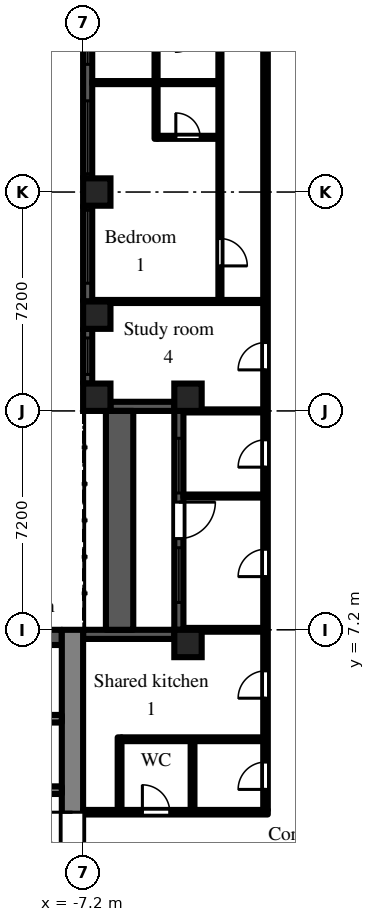
"""IFC4 building model, lengths in metres.
Left out: names, types, materials, properties, quantities, classifications, styles, units other than length and angle.
Written with IfcOpenShell. Run it as: python <this file> out.ifc"""

import sys

from ifc_helpers import new_model, si_unit, direction, frame, frame_2d, origin, origin_2d, place, context, subcontext, project, spatial, rectangle, extrude, element, fill, save


model = new_model("IFC4")
c1 = context("Model", 3, precision=1e-05, world=origin(), true_north=direction((0.0, 1.0)))
c2 = subcontext(c1, "Body", "Model", "MODEL_VIEW")
j1 = project(units=[si_unit("LENGTHUNIT", "METRE"), si_unit("PLANEANGLEUNIT", "RADIAN")], contexts=[c1])
p1 = place(None, origin())
s1 = spatial("IfcSite", under=j1, at=p1, CompositionType="ELEMENT")
p2 = place(p1, origin())
s2 = spatial("IfcBuilding", under=s1, at=p2, CompositionType="ELEMENT")
p3 = place(p2, frame((0.0, 0.0, 20.7)))
s3 = spatial("IfcBuildingStorey", under=s2, at=p3, CompositionType="ELEMENT", Elevation=20.7)
for number, where, z_axis, x_axis in (
    (1, (-6.75, 14.85, 0.0), (0.0, 0.0, 1.0), (1.0, 0.0, 0.0)),
    (2, (-6.75, 17.55, 0.0), (0.0, 0.0, 1.0), (1.0, 0.0, 0.0)),
    (3, (-6.75, 21.6, 0.0), (0.0, 0.0, 1.0), (1.0, 0.0, 0.0)),
    (4, (-3.75, 6.75, 0.0), (0.0, 0.0, 1.0), (1.0, 0.0, 0.0)),
    (5, (-3.75, 14.85, 0.0), (0.0, 0.0, 1.0), (1.0, 0.0, 0.0)),
):
    element("IfcColumn", number, at=place(p3, frame(where, z_axis=z_axis, x_axis=x_axis)), inside=s3, PredefinedType="COLUMN", context=c2, shape_type="SweptSolid", body=[
        extrude(rectangle(XDim=0.9, YDim=0.9, at=origin_2d()), origin(), (0.0, 0.0, 1.0), 3.0),
    ])
p4 = place(p3, frame((-7.05, 28.35, 0.0), z_axis=(0.0, 0.0, 1.0), x_axis=(0.0, -1.0, 0.0)))
e6 = element("IfcWall", 6, at=p4, inside=s3, PredefinedType="SOLIDWALL", context=c2, shape_type="SweptSolid", body=[
    extrude(rectangle(XDim=6.3, YDim=0.3, at=frame_2d((3.15, 0.0))), origin(), (0.0, 0.0, 1.0), 2.1),
])
p5 = place(p4, frame((0.15, 0.0, 0.2)))
e7 = element("IfcOpeningElement", 7, at=p5, cuts=e6, PredefinedType="OPENING", context=c2, shape_type="SweptSolid", body=[
    extrude(rectangle(XDim=2.4, YDim=1.85, at=frame_2d((1.2, 0.925))), frame((0.0, 0.16, 0.0), z_axis=(0.0, -1.0, 0.0), x_axis=(1.0, 0.0, 0.0)), (0.0, 0.0, 1.0), 0.32),
])
p6 = place(p4, frame((3.75, 0.0, 0.2)))
e8 = element("IfcOpeningElement", 8, at=p6, cuts=e6, PredefinedType="OPENING", context=c2, shape_type="SweptSolid", body=[
    extrude(rectangle(XDim=2.4, YDim=1.85, at=frame_2d((1.2, 0.925))), frame((0.0, 0.16, 0.0), z_axis=(0.0, -1.0, 0.0), x_axis=(1.0, 0.0, 0.0)), (0.0, 0.0, 1.0), 0.32),
])
p7 = place(p3, frame((-7.05, 21.15, 0.0), z_axis=(0.0, 0.0, 1.0), x_axis=(0.0, -1.0, 0.0)))
e9 = element("IfcWall", 9, at=p7, inside=s3, PredefinedType="SOLIDWALL", context=c2, shape_type="SweptSolid", body=[
    extrude(rectangle(XDim=3.15, YDim=0.3, at=frame_2d((1.575, 0.0))), origin(), (0.0, 0.0, 1.0), 2.1),
])
p8 = place(p7, frame((0.15, 0.0, 0.2)))
e10 = element("IfcOpeningElement", 10, at=p8, cuts=e9, PredefinedType="OPENING", context=c2, shape_type="SweptSolid", body=[
    extrude(rectangle(XDim=2.4, YDim=1.85, at=frame_2d((1.2, 0.925))), frame((0.0, 0.16, 0.0), z_axis=(0.0, -1.0, 0.0), x_axis=(1.0, 0.0, 0.0)), (0.0, 0.0, 1.0), 0.32),
])
p9 = place(p3, frame((-7.05, 17.1, 0.0), z_axis=(0.0, 0.0, 1.0), x_axis=(0.0, -1.0, 0.0)))
e11 = element("IfcWall", 11, at=p9, inside=s3, PredefinedType="SOLIDWALL", context=c2, shape_type="SweptSolid", body=[
    extrude(rectangle(XDim=1.8, YDim=0.3, at=frame_2d((0.9, 0.0))), origin(), (0.0, 0.0, 1.0), 2.1),
])
p10 = place(p9, frame((0.3, 0.0, 0.2)))
e12 = element("IfcOpeningElement", 12, at=p10, cuts=e11, PredefinedType="OPENING", context=c2, shape_type="SweptSolid", body=[
    extrude(rectangle(XDim=1.2, YDim=1.85, at=frame_2d((0.6, 0.925))), frame((0.0, 0.16, 0.0), z_axis=(0.0, -1.0, 0.0), x_axis=(1.0, 0.0, 0.0)), (0.0, 0.0, 1.0), 0.32),
])
p11 = place(p3, frame((-6.3, 14.55, 0.0), z_axis=(0.0, 0.0, 1.0), x_axis=(1.0, 0.0, 0.0)))
e13 = element("IfcWall", 13, at=p11, inside=s3, PredefinedType="SOLIDWALL", context=c2, shape_type="SweptSolid", body=[
    extrude(rectangle(XDim=2.1, YDim=0.3, at=frame_2d((1.05, 0.0))), origin(), (0.0, 0.0, 1.0), 2.1),
])
p12 = place(p3, frame((-4.05, 14.4, 0.0), z_axis=(0.0, 0.0, 1.0), x_axis=(0.0, -1.0, 0.0)))
e14 = element("IfcWall", 14, at=p12, inside=s3, PredefinedType="SOLIDWALL", context=c2, shape_type="SweptSolid", body=[
    extrude(rectangle(XDim=7.2, YDim=0.3, at=frame_2d((3.6, 0.0))), origin(), (0.0, 0.0, 1.0), 2.1),
])
p13 = place(p12, frame((3.0, 0.0, 0.0)))
e15 = element("IfcOpeningElement", 15, at=p13, cuts=e14, PredefinedType="OPENING", context=c2, shape_type="SweptSolid", body=[
    extrude(rectangle(XDim=1.2, YDim=2.05, at=frame_2d((0.6, 1.025))), frame((0.0, 0.16, 0.0), z_axis=(0.0, -1.0, 0.0), x_axis=(1.0, 0.0, 0.0)), (0.0, 0.0, 1.0), 0.32),
])
p14 = place(p12, frame((0.9, 0.0, 0.2)))
e16 = element("IfcOpeningElement", 16, at=p14, cuts=e14, PredefinedType="OPENING", context=c2, shape_type="SweptSolid", body=[
    extrude(rectangle(XDim=1.8, YDim=1.85, at=frame_2d((0.9, 0.925))), frame((0.0, 0.16, 0.0), z_axis=(0.0, -1.0, 0.0), x_axis=(1.0, 0.0, 0.0)), (0.0, 0.0, 1.0), 0.32),
])
p15 = place(p12, frame((4.5, 0.0, 0.2)))
e17 = element("IfcOpeningElement", 17, at=p15, cuts=e14, PredefinedType="OPENING", context=c2, shape_type="SweptSolid", body=[
    extrude(rectangle(XDim=1.8, YDim=1.85, at=frame_2d((0.9, 0.925))), frame((0.0, 0.16, 0.0), z_axis=(0.0, -1.0, 0.0), x_axis=(1.0, 0.0, 0.0)), (0.0, 0.0, 1.0), 0.32),
])
p16 = place(p3, frame((-4.2, 7.05, 0.0), z_axis=(0.0, 0.0, 1.0), x_axis=(-1.0, 0.0, 0.0)))
e18 = element("IfcWall", 18, at=p16, inside=s3, PredefinedType="SOLIDWALL", context=c2, shape_type="SweptSolid", body=[
    extrude(rectangle(XDim=3.0, YDim=0.3, at=frame_2d((1.5, 0.0))), origin(), (0.0, 0.0, 1.0), 2.1),
])
p17 = place(p3, frame((-6.0, 7.2, 0.0), z_axis=(0.0, 0.0, 1.0), x_axis=(0.0, 1.0, 0.0)))
e19 = element("IfcWall", 19, at=p17, inside=s3, PredefinedType="PARAPET", context=c2, shape_type="SweptSolid", body=[
    extrude(rectangle(XDim=7.2, YDim=0.9, at=frame_2d((3.6, 0.0))), origin(), (0.0, 0.0, 1.0), 0.8),
])
p18 = place(p3, frame((-7.55, -7.2, 0.0), z_axis=(0.0, 0.0, 1.0), x_axis=(0.0, 1.0, 0.0)))
e20 = element("IfcWall", 20, at=p18, inside=s3, PredefinedType="SHEAR", context=c2, shape_type="SweptSolid", body=[
    extrude(rectangle(XDim=14.4, YDim=0.7, at=frame_2d((7.2, 0.0))), origin(), (0.0, 0.0, 1.0), 2.575),
])
p19 = place(p18, frame((6.0, 0.0, 0.0)))
e21 = element("IfcOpeningElement", 21, at=p19, cuts=e20, PredefinedType="OPENING", context=c2, shape_type="SweptSolid", body=[
    extrude(rectangle(XDim=2.4, YDim=2.2, at=frame_2d((1.2, 1.1))), frame((0.0, 0.36, 0.0), z_axis=(0.0, -1.0, 0.0), x_axis=(1.0, 0.0, 0.0)), (0.0, 0.0, 1.0), 0.72),
])
p20 = place(p3, frame((-7.9, 6.95, 0.0), z_axis=(0.0, 0.0, 1.0), x_axis=(-1.0, 0.0, 0.0)))
e22 = element("IfcWall", 22, at=p20, inside=s3, PredefinedType="SHEAR", context=c2, shape_type="SweptSolid", body=[
    extrude(rectangle(XDim=12.95, YDim=0.5, at=frame_2d((6.475, 0.0))), origin(), (0.0, 0.0, 1.0), 2.575),
])
p21 = place(p3, frame((-7.9, 1.925, 0.0), z_axis=(0.0, 0.0, 1.0), x_axis=(-1.0, 0.0, 0.0)))
e23 = element("IfcWall", 23, at=p21, inside=s3, PredefinedType="SHEAR", context=c2, shape_type="SweptSolid", body=[
    extrude(rectangle(XDim=12.95, YDim=0.25, at=frame_2d((6.475, 0.0))), origin(), (0.0, 0.0, 1.0), 2.575),
])
p22 = place(p21, frame((0.525, 0.0, 0.0)))
e24 = element("IfcOpeningElement", 24, at=p22, cuts=e23, PredefinedType="OPENING", context=c2, shape_type="SweptSolid", body=[
    extrude(rectangle(XDim=0.9, YDim=2.1, at=frame_2d((0.45, 1.05))), frame((0.0, 0.135, 0.0), z_axis=(0.0, -1.0, 0.0), x_axis=(1.0, 0.0, 0.0)), (0.0, 0.0, 1.0), 0.27),
])
p23 = place(p21, frame((2.625, 0.0, 0.0)))
e25 = element("IfcOpeningElement", 25, at=p23, cuts=e23, PredefinedType="OPENING", context=c2, shape_type="SweptSolid", body=[
    extrude(rectangle(XDim=1.1, YDim=2.1, at=frame_2d((0.55, 1.05))), frame((0.0, 0.135, 0.0), z_axis=(0.0, -1.0, 0.0), x_axis=(1.0, 0.0, 0.0)), (0.0, 0.0, 1.0), 0.27),
])
p24 = place(p21, frame((4.925, 0.0, 0.0)))
e26 = element("IfcOpeningElement", 26, at=p24, cuts=e23, PredefinedType="OPENING", context=c2, shape_type="SweptSolid", body=[
    extrude(rectangle(XDim=0.9, YDim=2.1, at=frame_2d((0.45, 1.05))), frame((0.0, 0.135, 0.0), z_axis=(0.0, -1.0, 0.0), x_axis=(1.0, 0.0, 0.0)), (0.0, 0.0, 1.0), 0.27),
])
p25 = place(p21, frame((8.225, 0.0, 0.0)))
e27 = element("IfcOpeningElement", 27, at=p25, cuts=e23, PredefinedType="OPENING", context=c2, shape_type="SweptSolid", body=[
    extrude(rectangle(XDim=0.9, YDim=2.1, at=frame_2d((0.45, 1.05))), frame((0.0, 0.135, 0.0), z_axis=(0.0, -1.0, 0.0), x_axis=(1.0, 0.0, 0.0)), (0.0, 0.0, 1.0), 0.27),
])
p26 = place(p3, frame((-7.9, 4.275, 0.0), z_axis=(0.0, 0.0, 1.0), x_axis=(-1.0, 0.0, 0.0)))
e28 = element("IfcWall", 28, at=p26, inside=s3, PredefinedType="SHEAR", context=c2, shape_type="SweptSolid", body=[
    extrude(rectangle(XDim=1.95, YDim=0.25, at=frame_2d((0.975, 0.0))), origin(), (0.0, 0.0, 1.0), 2.575),
])
p27 = place(p3, frame((-7.2, 1.2, 0.0), z_axis=(0.0, 0.0, 1.0), x_axis=(1.0, 0.0, 0.0)))
e29 = element("IfcWall", 29, at=p27, inside=s3, PredefinedType="PARTITIONING", context=c2, shape_type="SweptSolid", body=[
    extrude(rectangle(XDim=6.075, YDim=0.15, at=frame_2d((3.038, 0.0))), origin(), (0.0, 0.0, 1.0), 2.575),
])
p28 = place(p27, frame((1.95, 0.0, 0.0)))
e30 = element("IfcOpeningElement", 30, at=p28, cuts=e29, PredefinedType="OPENING", context=c2, shape_type="SweptSolid", body=[
    extrude(rectangle(XDim=0.9, YDim=2.1, at=frame_2d((0.45, 1.05))), frame((0.0, 0.085, 0.0), z_axis=(0.0, -1.0, 0.0), x_axis=(1.0, 0.0, 0.0)), (0.0, 0.0, 1.0), 0.17),
])
p29 = place(p3, frame((-6.9, 18.0, 0.0), z_axis=(0.0, 0.0, 1.0), x_axis=(1.0, 0.0, 0.0)))
e31 = element("IfcWall", 31, at=p29, inside=s3, PredefinedType="PARTITIONING", context=c2, shape_type="SweptSolid", body=[
    extrude(rectangle(XDim=5.625, YDim=0.1, at=frame_2d((2.812, 0.0))), origin(), (0.0, 0.0, 1.0), 2.575),
])
p30 = place(p3, frame((-6.9, 25.2, 0.0), z_axis=(0.0, 0.0, 1.0), x_axis=(1.0, 0.0, 0.0)))
e32 = element("IfcWall", 32, at=p30, inside=s3, PredefinedType="PARTITIONING", context=c2, shape_type="SweptSolid", body=[
    extrude(rectangle(XDim=4.15, YDim=0.1, at=frame_2d((2.075, 0.0))), origin(), (0.0, 0.0, 1.0), 2.575),
])
p31 = place(p3, frame((-6.0, 1.275, 0.0), z_axis=(0.0, 0.0, 1.0), x_axis=(0.0, 1.0, 0.0)))
e33 = element("IfcWall", 33, at=p31, inside=s3, PredefinedType="PARTITIONING", context=c2, shape_type="SweptSolid", body=[
    extrude(rectangle(XDim=2.388, YDim=0.125, at=frame_2d((1.194, 0.0))), origin(), (0.0, 0.0, 1.0), 2.575),
])
p32 = place(p3, frame((-5.938, 3.6, 0.0), z_axis=(0.0, 0.0, 1.0), x_axis=(1.0, 0.0, 0.0)))
e34 = element("IfcWall", 34, at=p32, inside=s3, PredefinedType="PARTITIONING", context=c2, shape_type="SweptSolid", body=[
    extrude(rectangle(XDim=4.663, YDim=0.125, at=frame_2d((2.331, 0.0))), origin(), (0.0, 0.0, 1.0), 2.575),
])
p33 = place(p3, frame((-4.8, 23.35, 0.0), z_axis=(0.0, 0.0, 1.0), x_axis=(0.0, 1.0, 0.0)))
e35 = element("IfcWall", 35, at=p33, inside=s3, PredefinedType="PARTITIONING", context=c2, shape_type="SweptSolid", body=[
    extrude(rectangle(XDim=3.7, YDim=0.1, at=frame_2d((1.85, 0.0))), origin(), (0.0, 0.0, 1.0), 2.575),
])
p34 = place(p3, frame((-4.75, 23.4, 0.0), z_axis=(0.0, 0.0, 1.0), x_axis=(1.0, 0.0, 0.0)))
e36 = element("IfcWall", 36, at=p34, inside=s3, PredefinedType="PARTITIONING", context=c2, shape_type="SweptSolid", body=[
    extrude(rectangle(XDim=2.0, YDim=0.1, at=frame_2d((1.0, 0.0))), origin(), (0.0, 0.0, 1.0), 2.575),
])
p35 = place(p34, frame((0.6, 0.0, 0.0)))
e37 = element("IfcOpeningElement", 37, at=p35, cuts=e36, PredefinedType="OPENING", context=c2, shape_type="SweptSolid", body=[
    extrude(rectangle(XDim=0.8, YDim=2.1, at=frame_2d((0.4, 1.05))), frame((0.0, 0.06, 0.0), z_axis=(0.0, -1.0, 0.0), x_axis=(1.0, 0.0, 0.0)), (0.0, 0.0, 1.0), 0.12),
])
p36 = place(p3, frame((-3.9, 7.2, 0.0), z_axis=(0.0, 0.0, 1.0), x_axis=(1.0, 0.0, 0.0)))
e38 = element("IfcWall", 38, at=p36, inside=s3, PredefinedType="PARTITIONING", context=c2, shape_type="SweptSolid", body=[
    extrude(rectangle(XDim=2.625, YDim=0.125, at=frame_2d((1.312, 0.0))), origin(), (0.0, 0.0, 1.0), 2.575),
])
for number, where, z_axis, x_axis in (
    (39, (-3.9, 11.6, 0.0), (0.0, 0.0, 1.0), (1.0, 0.0, 0.0)),
    (40, (-3.9, 14.4, 0.0), (0.0, 0.0, 1.0), (1.0, 0.0, 0.0)),
):
    element("IfcWall", number, at=place(p3, frame(where, z_axis=z_axis, x_axis=x_axis)), inside=s3, PredefinedType="PARTITIONING", context=c2, shape_type="SweptSolid", body=[
        extrude(rectangle(XDim=2.625, YDim=0.1, at=frame_2d((1.312, 0.0))), origin(), (0.0, 0.0, 1.0), 2.575),
    ])
p37 = place(p3, frame((-3.6, 1.275, 0.0), z_axis=(0.0, 0.0, 1.0), x_axis=(0.0, 1.0, 0.0)))
e41 = element("IfcWall", 41, at=p37, inside=s3, PredefinedType="PARTITIONING", context=c2, shape_type="SweptSolid", body=[
    extrude(rectangle(XDim=2.263, YDim=0.125, at=frame_2d((1.131, 0.0))), origin(), (0.0, 0.0, 1.0), 2.575),
])
p38 = place(p3, frame((-2.7, 18.05, 0.0), z_axis=(0.0, 0.0, 1.0), x_axis=(0.0, 1.0, 0.0)))
e42 = element("IfcWall", 42, at=p38, inside=s3, PredefinedType="PARTITIONING", context=c2, shape_type="SweptSolid", body=[
    extrude(rectangle(XDim=14.3, YDim=0.1, at=frame_2d((7.15, 0.0))), origin(), (0.0, 0.0, 1.0), 2.575),
])
p39 = place(p38, frame((1.12, 0.0, 0.0)))
e43 = element("IfcOpeningElement", 43, at=p39, cuts=e42, PredefinedType="OPENING", context=c2, shape_type="SweptSolid", body=[
    extrude(rectangle(XDim=0.9, YDim=2.1, at=frame_2d((0.45, 1.05))), frame((0.0, 0.06, 0.0), z_axis=(0.0, -1.0, 0.0), x_axis=(1.0, 0.0, 0.0)), (0.0, 0.0, 1.0), 0.12),
])
p40 = place(p38, frame((12.28, 0.0, 0.0)))
e44 = element("IfcOpeningElement", 44, at=p40, cuts=e42, PredefinedType="OPENING", context=c2, shape_type="SweptSolid", body=[
    extrude(rectangle(XDim=0.9, YDim=2.1, at=frame_2d((0.45, 1.05))), frame((0.0, 0.06, 0.0), z_axis=(0.0, -1.0, 0.0), x_axis=(1.0, 0.0, 0.0)), (0.0, 0.0, 1.0), 0.12),
])
p41 = place(p3, frame((-1.2, 1.275, 0.0), z_axis=(0.0, 0.0, 1.0), x_axis=(0.0, 1.0, 0.0)))
e45 = element("IfcWall", 45, at=p41, inside=s3, PredefinedType="PARTITIONING", context=c2, shape_type="SweptSolid", body=[
    extrude(rectangle(XDim=35.225, YDim=0.15, at=frame_2d((17.613, 0.0))), origin(), (0.0, 0.0, 1.0), 2.575),
])
p42 = place(p41, frame((0.675, 0.0, 0.0)))
e46 = element("IfcOpeningElement", 46, at=p42, cuts=e45, PredefinedType="OPENING", context=c2, shape_type="SweptSolid", body=[
    extrude(rectangle(XDim=0.9, YDim=2.1, at=frame_2d((0.45, 1.05))), frame((0.0, 0.085, 0.0), z_axis=(0.0, -1.0, 0.0), x_axis=(1.0, 0.0, 0.0)), (0.0, 0.0, 1.0), 0.17),
])
p43 = place(p41, frame((3.675, 0.0, 0.0)))
e47 = element("IfcOpeningElement", 47, at=p43, cuts=e45, PredefinedType="OPENING", context=c2, shape_type="SweptSolid", body=[
    extrude(rectangle(XDim=0.9, YDim=2.1, at=frame_2d((0.45, 1.05))), frame((0.0, 0.085, 0.0), z_axis=(0.0, -1.0, 0.0), x_axis=(1.0, 0.0, 0.0)), (0.0, 0.0, 1.0), 0.17),
])
p44 = place(p41, frame((11.275, 0.0, 0.0)))
e48 = element("IfcOpeningElement", 48, at=p44, cuts=e45, PredefinedType="OPENING", context=c2, shape_type="SweptSolid", body=[
    extrude(rectangle(XDim=0.9, YDim=2.1, at=frame_2d((0.45, 1.05))), frame((0.0, 0.085, 0.0), z_axis=(0.0, -1.0, 0.0), x_axis=(1.0, 0.0, 0.0)), (0.0, 0.0, 1.0), 0.17),
])
p45 = place(p41, frame((7.675, 0.0, 0.0)))
e49 = element("IfcOpeningElement", 49, at=p45, cuts=e45, PredefinedType="OPENING", context=c2, shape_type="SweptSolid", body=[
    extrude(rectangle(XDim=0.9, YDim=2.1, at=frame_2d((0.45, 1.05))), frame((0.0, 0.085, 0.0), z_axis=(0.0, -1.0, 0.0), x_axis=(1.0, 0.0, 0.0)), (0.0, 0.0, 1.0), 0.17),
])
p46 = place(p41, frame((14.475, 0.0, 0.0)))
e50 = element("IfcOpeningElement", 50, at=p46, cuts=e45, PredefinedType="OPENING", context=c2, shape_type="SweptSolid", body=[
    extrude(rectangle(XDim=0.9, YDim=2.1, at=frame_2d((0.45, 1.05))), frame((0.0, 0.085, 0.0), z_axis=(0.0, -1.0, 0.0), x_axis=(1.0, 0.0, 0.0)), (0.0, 0.0, 1.0), 0.17),
])
p47 = place(p41, frame((32.675, 0.0, 0.0)))
e51 = element("IfcOpeningElement", 51, at=p47, cuts=e45, PredefinedType="OPENING", context=c2, shape_type="SweptSolid", body=[
    extrude(rectangle(XDim=1.0, YDim=2.1, at=frame_2d((0.5, 1.05))), frame((0.0, 0.085, 0.0), z_axis=(0.0, -1.0, 0.0), x_axis=(1.0, 0.0, 0.0)), (0.0, 0.0, 1.0), 0.17),
])
p48 = place(p5, origin())
e52 = element("IfcWindow", 52, at=p48, inside=s3, PartitioningType="SINGLE_PANEL", PredefinedType="WINDOW", context=c2, shape_type="SweptSolid", body=[
    extrude(rectangle(XDim=2.4, YDim=1.85, at=frame_2d((1.2, 0.925))), frame((0.0, 0.03, 0.0), z_axis=(0.0, -1.0, 0.0), x_axis=(1.0, 0.0, 0.0)), (0.0, 0.0, 1.0), 0.06),
])
fill(e7, e52)
p49 = place(p6, origin())
e53 = element("IfcWindow", 53, at=p49, inside=s3, PartitioningType="SINGLE_PANEL", PredefinedType="WINDOW", context=c2, shape_type="SweptSolid", body=[
    extrude(rectangle(XDim=2.4, YDim=1.85, at=frame_2d((1.2, 0.925))), frame((0.0, 0.03, 0.0), z_axis=(0.0, -1.0, 0.0), x_axis=(1.0, 0.0, 0.0)), (0.0, 0.0, 1.0), 0.06),
])
fill(e8, e53)
p50 = place(p8, origin())
e54 = element("IfcWindow", 54, at=p50, inside=s3, PartitioningType="SINGLE_PANEL", PredefinedType="WINDOW", context=c2, shape_type="SweptSolid", body=[
    extrude(rectangle(XDim=2.4, YDim=1.85, at=frame_2d((1.2, 0.925))), frame((0.0, 0.03, 0.0), z_axis=(0.0, -1.0, 0.0), x_axis=(1.0, 0.0, 0.0)), (0.0, 0.0, 1.0), 0.06),
])
fill(e10, e54)
p51 = place(p10, origin())
e55 = element("IfcWindow", 55, at=p51, inside=s3, PartitioningType="SINGLE_PANEL", PredefinedType="WINDOW", context=c2, shape_type="SweptSolid", body=[
    extrude(rectangle(XDim=1.2, YDim=1.85, at=frame_2d((0.6, 0.925))), frame((0.0, 0.03, 0.0), z_axis=(0.0, -1.0, 0.0), x_axis=(1.0, 0.0, 0.0)), (0.0, 0.0, 1.0), 0.06),
])
fill(e12, e55)
p52 = place(p13, origin())
e56 = element("IfcDoor", 56, at=p52, inside=s3, OperationType="SINGLE_SWING_LEFT", PredefinedType="DOOR", context=c2, shape_type="SweptSolid", body=[
    extrude(rectangle(XDim=1.2, YDim=2.05, at=frame_2d((0.6, 1.025))), frame((0.0, 0.025, 0.0), z_axis=(0.0, -1.0, 0.0), x_axis=(1.0, 0.0, 0.0)), (0.0, 0.0, 1.0), 0.05),
])
fill(e15, e56)
p53 = place(p14, origin())
e57 = element("IfcWindow", 57, at=p53, inside=s3, PartitioningType="SINGLE_PANEL", PredefinedType="WINDOW", context=c2, shape_type="SweptSolid", body=[
    extrude(rectangle(XDim=1.8, YDim=1.85, at=frame_2d((0.9, 0.925))), frame((0.0, 0.03, 0.0), z_axis=(0.0, -1.0, 0.0), x_axis=(1.0, 0.0, 0.0)), (0.0, 0.0, 1.0), 0.06),
])
fill(e16, e57)
p54 = place(p15, origin())
e58 = element("IfcWindow", 58, at=p54, inside=s3, PartitioningType="SINGLE_PANEL", PredefinedType="WINDOW", context=c2, shape_type="SweptSolid", body=[
    extrude(rectangle(XDim=1.8, YDim=1.85, at=frame_2d((0.9, 0.925))), frame((0.0, 0.03, 0.0), z_axis=(0.0, -1.0, 0.0), x_axis=(1.0, 0.0, 0.0)), (0.0, 0.0, 1.0), 0.06),
])
fill(e17, e58)
p55 = place(p19, origin())
e59 = element("IfcDoor", 59, at=p55, inside=s3, OperationType="DOUBLE_DOOR_DOUBLE_SWING", PredefinedType="DOOR", context=c2, shape_type="SweptSolid", body=[
    extrude(rectangle(XDim=2.4, YDim=2.2, at=frame_2d((1.2, 1.1))), frame((0.0, 0.025, 0.0), z_axis=(0.0, -1.0, 0.0), x_axis=(1.0, 0.0, 0.0)), (0.0, 0.0, 1.0), 0.05),
])
fill(e21, e59)
p56 = place(p42, origin())
e60 = element("IfcDoor", 60, at=p56, inside=s3, OperationType="SINGLE_SWING_LEFT", PredefinedType="DOOR", context=c2, shape_type="SweptSolid", body=[
    extrude(rectangle(XDim=0.9, YDim=2.1, at=frame_2d((0.45, 1.05))), frame((0.0, 0.025, 0.0), z_axis=(0.0, -1.0, 0.0), x_axis=(1.0, 0.0, 0.0)), (0.0, 0.0, 1.0), 0.05),
])
fill(e46, e60)
p57 = place(p28, origin())
e61 = element("IfcDoor", 61, at=p57, inside=s3, OperationType="SINGLE_SWING_LEFT", PredefinedType="DOOR", context=c2, shape_type="SweptSolid", body=[
    extrude(rectangle(XDim=0.9, YDim=2.1, at=frame_2d((0.45, 1.05))), frame((0.0, 0.025, 0.0), z_axis=(0.0, -1.0, 0.0), x_axis=(1.0, 0.0, 0.0)), (0.0, 0.0, 1.0), 0.05),
])
fill(e30, e61)
p58 = place(p43, origin())
e62 = element("IfcDoor", 62, at=p58, inside=s3, OperationType="SINGLE_SWING_LEFT", PredefinedType="DOOR", context=c2, shape_type="SweptSolid", body=[
    extrude(rectangle(XDim=0.9, YDim=2.1, at=frame_2d((0.45, 1.05))), frame((0.0, 0.025, 0.0), z_axis=(0.0, -1.0, 0.0), x_axis=(1.0, 0.0, 0.0)), (0.0, 0.0, 1.0), 0.05),
])
fill(e47, e62)
p59 = place(p44, origin())
e63 = element("IfcDoor", 63, at=p59, inside=s3, OperationType="SINGLE_SWING_LEFT", PredefinedType="DOOR", context=c2, shape_type="SweptSolid", body=[
    extrude(rectangle(XDim=0.9, YDim=2.1, at=frame_2d((0.45, 1.05))), frame((0.0, 0.025, 0.0), z_axis=(0.0, -1.0, 0.0), x_axis=(1.0, 0.0, 0.0)), (0.0, 0.0, 1.0), 0.05),
])
fill(e48, e63)
p60 = place(p45, origin())
e64 = element("IfcDoor", 64, at=p60, inside=s3, OperationType="SINGLE_SWING_LEFT", PredefinedType="DOOR", context=c2, shape_type="SweptSolid", body=[
    extrude(rectangle(XDim=0.9, YDim=2.1, at=frame_2d((0.45, 1.05))), frame((0.0, 0.025, 0.0), z_axis=(0.0, -1.0, 0.0), x_axis=(1.0, 0.0, 0.0)), (0.0, 0.0, 1.0), 0.05),
])
fill(e49, e64)
p61 = place(p46, origin())
e65 = element("IfcDoor", 65, at=p61, inside=s3, OperationType="SINGLE_SWING_LEFT", PredefinedType="DOOR", context=c2, shape_type="SweptSolid", body=[
    extrude(rectangle(XDim=0.9, YDim=2.1, at=frame_2d((0.45, 1.05))), frame((0.0, 0.025, 0.0), z_axis=(0.0, -1.0, 0.0), x_axis=(1.0, 0.0, 0.0)), (0.0, 0.0, 1.0), 0.05),
])
fill(e50, e65)
p62 = place(p39, frame((0.9, 0.0, 0.0), z_axis=(0.0, 0.0, 1.0), x_axis=(-1.0, 0.0, 0.0)))
e66 = element("IfcDoor", 66, at=p62, inside=s3, OperationType="SINGLE_SWING_RIGHT", PredefinedType="DOOR", context=c2, shape_type="SweptSolid", body=[
    extrude(rectangle(XDim=0.9, YDim=2.1, at=frame_2d((0.45, 1.05))), frame((0.0, 0.025, 0.0), z_axis=(0.0, -1.0, 0.0), x_axis=(1.0, 0.0, 0.0)), (0.0, 0.0, 1.0), 0.05),
])
fill(e43, e66)
p63 = place(p35, origin())
e67 = element("IfcDoor", 67, at=p63, inside=s3, OperationType="SINGLE_SWING_LEFT", PredefinedType="DOOR", context=c2, shape_type="SweptSolid", body=[
    extrude(rectangle(XDim=0.8, YDim=2.1, at=frame_2d((0.4, 1.05))), frame((0.0, 0.025, 0.0), z_axis=(0.0, -1.0, 0.0), x_axis=(1.0, 0.0, 0.0)), (0.0, 0.0, 1.0), 0.05),
])
fill(e37, e67)
save(model, sys.argv[1])
